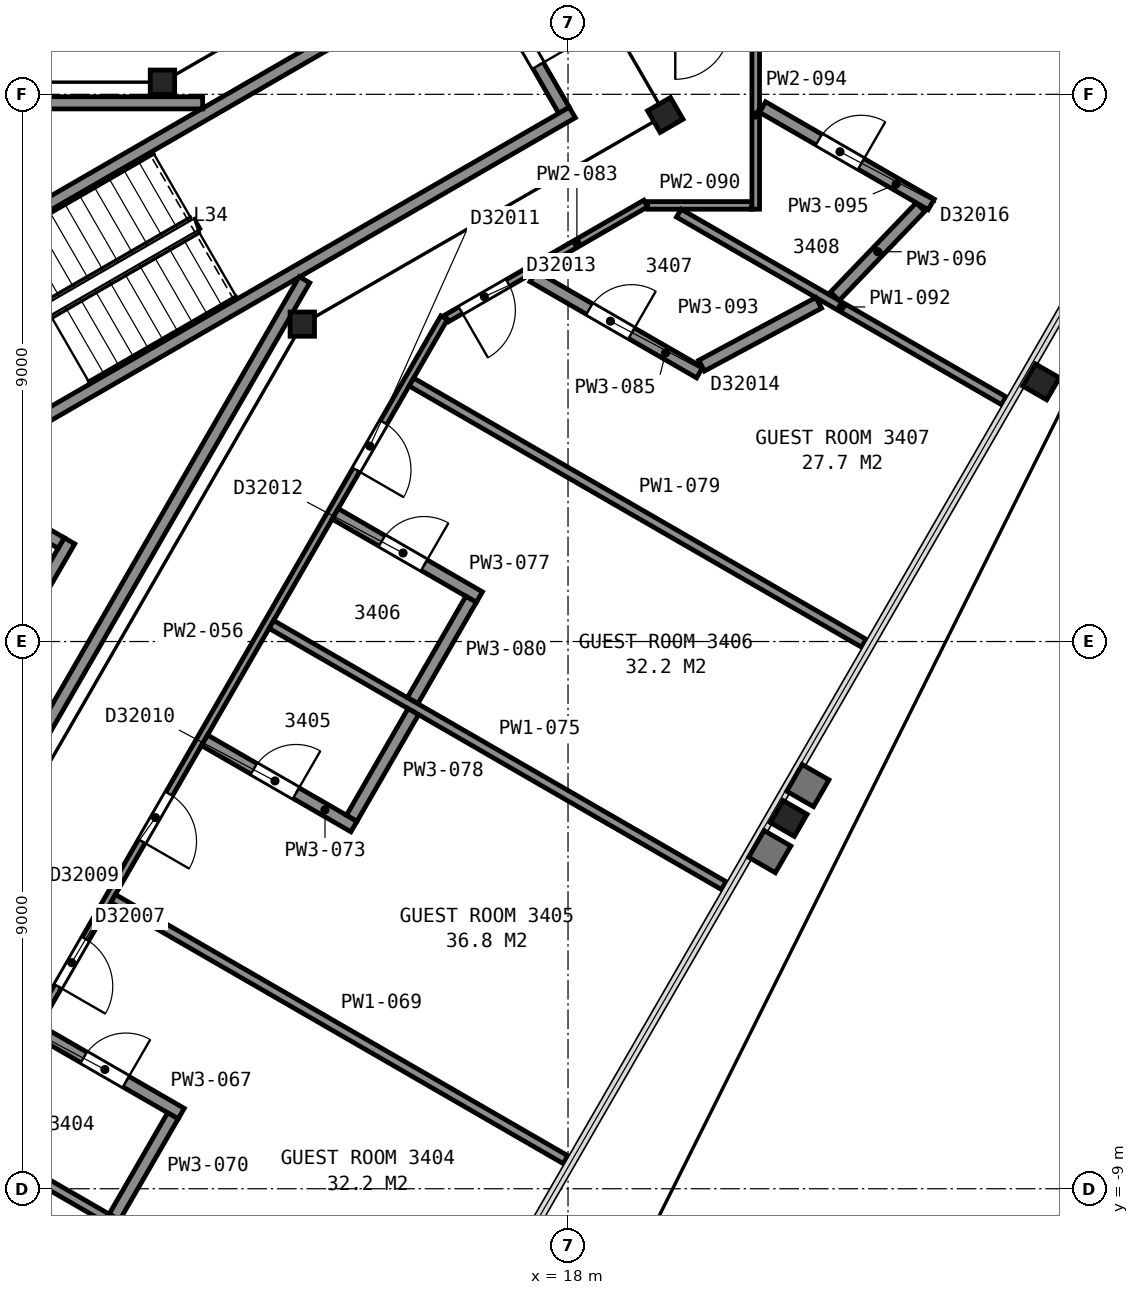
"""IFC4 building model, lengths in metres.
Left out: names, types, materials, properties, quantities, classifications, styles, units other than length and angle.
Written with IfcOpenShell. Run it as: python <this file> out.ifc"""

import sys

from ifc_helpers import new_model, si_unit, direction, frame, frame_2d, origin, origin_2d, place, context, subcontext, project, spatial, rectangle, i_section, extrude, element, fill, save


model = new_model("IFC4")
c1 = context("Model", 3, precision=1e-05, world=origin(), true_north=direction((0.0, 1.0)))
c2 = subcontext(c1, "Body", "Model", "MODEL_VIEW")
j1 = project(units=[si_unit("LENGTHUNIT", "METRE"), si_unit("PLANEANGLEUNIT", "RADIAN")], contexts=[c1])
p1 = place(None, origin())
s1 = spatial("IfcSite", under=j1, at=p1, CompositionType="ELEMENT")
p2 = place(p1, origin())
s2 = spatial("IfcBuilding", under=s1, at=p2, CompositionType="ELEMENT")
p3 = place(p2, frame((0.0, 0.0, 139.6)))
s3 = spatial("IfcBuildingStorey", under=s2, at=p3, CompositionType="ELEMENT", Elevation=139.6)
for number, where, z_axis, x_axis in (
    (1, (21.63, -2.91, 0.0), (0.0, 0.0, 1.0), (-0.5, -0.866, 0.0)),
    (2, (25.78, 4.27, 0.0), (0.0, 0.0, 1.0), (-0.5, -0.866, 0.0)),
):
    element("IfcColumn", number, at=place(p3, frame(where, z_axis=z_axis, x_axis=x_axis)), inside=s3, PredefinedType="COLUMN", context=c2, shape_type="SweptSolid", body=[
        extrude(i_section(OverallWidth=0.419, OverallDepth=0.455, WebThickness=0.042, FlangeThickness=0.068, FilletRadius=0.015, at=origin_2d()), origin(), (0.0, 0.0, 1.0), 2.87),
    ])
p4 = place(p3, frame((13.63, 5.22, 0.0), z_axis=(0.0, 0.0, 1.0), x_axis=(1.0, 0.0, 0.0)))
e3 = element("IfcColumn", 3, at=p4, inside=s3, PredefinedType="COLUMN", context=c2, shape_type="SweptSolid", body=[
    extrude(i_section(OverallWidth=0.401, OverallDepth=0.399, WebThickness=0.025, FlangeThickness=0.04, FilletRadius=0.015, at=origin_2d()), origin(), (0.0, 0.0, 1.0), 3.535),
])
p5 = place(p3, frame((19.6, 8.66, 0.0), z_axis=(0.0, 0.0, 1.0), x_axis=(0.5, -0.866025403784, 0.0)))
e4 = element("IfcColumn", 4, at=p5, inside=s3, PredefinedType="COLUMN", context=c2, shape_type="SweptSolid", body=[
    extrude(i_section(OverallWidth=0.411, OverallDepth=0.434, WebThickness=0.036, FlangeThickness=0.057, FilletRadius=0.015, at=origin_2d()), origin(), (0.0, 0.0, 1.0), 3.545),
])
p6 = place(p3, frame((11.33, 9.2, 0.0), z_axis=(0.0, 0.0, 1.0), x_axis=(1.0, 0.0, 0.0)))
e5 = element("IfcColumn", 5, at=p6, inside=s3, PredefinedType="COLUMN", context=c2, shape_type="SweptSolid", body=[
    extrude(i_section(OverallWidth=0.401, OverallDepth=0.399, WebThickness=0.025, FlangeThickness=0.04, FilletRadius=0.015, at=origin_2d()), origin(), (0.0, 0.0, 1.0), 3.535),
])
p7 = place(p3, frame((17.934, 8.738, 0.0), z_axis=(0.0, 0.0, 1.0), x_axis=(-0.49998411664, 0.866034573852, 0.0)))
e6 = element("IfcWall", 6, at=p7, inside=s3, PredefinedType="PARTITIONING", context=c2, shape_type="SweptSolid", body=[
    extrude(rectangle(XDim=2.8, YDim=0.2, at=frame_2d((1.4, 0.0))), origin(), (0.0, 0.0, 1.0), 3.35),
])
p8 = place(p7, frame((0.85, 0.0, 0.0)))
e7 = element("IfcOpeningElement", 7, at=p8, cuts=e6, PredefinedType="OPENING", context=c2, shape_type="SweptSolid", body=[
    extrude(rectangle(XDim=1.1, YDim=2.1, at=frame_2d((0.55, 1.05))), frame((0.0, 0.11, 0.0), z_axis=(0.0, -1.0, 0.0), x_axis=(1.0, 0.0, 0.0)), (0.0, 0.0, 1.0), 0.22),
])
for number, where, z_axis, x_axis in (
    (8, (6.178, 5.299, 0.0), (0.0, 0.0, 1.0), (0.866, 0.5, 0.0)),
    (9, (7.678, 2.701, 0.0), (0.0, 0.0, 1.0), (0.866, 0.5, 0.0)),
):
    element("IfcWall", number, at=place(p3, frame(where, z_axis=z_axis, x_axis=x_axis)), inside=s3, PredefinedType="PARTITIONING", context=c2, shape_type="SweptSolid", body=[
        extrude(rectangle(XDim=12.0, YDim=0.2, at=frame_2d((6.0, 0.0))), origin(), (0.0, 0.0, 1.0), 3.35),
    ])
p9 = place(p3, frame((7.451, -2.414, 0.0), z_axis=(0.0, 0.0, 1.0), x_axis=(0.500016218704, 0.866016039709, 0.0)))
e10 = element("IfcWall", 10, at=p9, inside=s3, PredefinedType="PARTITIONING", context=c2, shape_type="SweptSolid", body=[
    extrude(rectangle(XDim=4.7, YDim=0.2, at=frame_2d((2.35, 0.0))), origin(), (0.0, 0.0, 1.0), 3.6),
])
p10 = place(p3, frame((9.665, 1.62, 0.0), z_axis=(0.0, 0.0, 1.0), x_axis=(-0.866002029911, 0.500040482552, 0.0)))
e11 = element("IfcWall", 11, at=p10, inside=s3, PredefinedType="PARTITIONING", context=c2, shape_type="SweptSolid", body=[
    extrude(rectangle(XDim=1.75, YDim=0.2, at=frame_2d((0.875, 0.0))), origin(), (0.0, 0.0, 1.0), 3.6),
])
p11 = place(p3, frame((6.177, 8.86, 0.0), z_axis=(0.0, 0.0, 1.0), x_axis=(1.0, 0.0, 0.0)))
e12 = element("IfcWall", 12, at=p11, inside=s3, PredefinedType="PARTITIONING", context=c2, shape_type="SweptSolid", body=[
    extrude(rectangle(XDim=5.814, YDim=0.2, at=frame_2d((2.907, 0.0))), origin(), (0.0, 0.0, 1.0), 3.35),
])
p12 = place(p3, frame((8.492, -3.012, 0.0), z_axis=(0.0, 0.0, 1.0), x_axis=(0.499972957231, 0.866041016371, 0.0)))
e13 = element("IfcWall", 13, at=p12, inside=s3, PredefinedType="PARTITIONING", context=c2, shape_type="SweptSolid", body=[
    extrude(rectangle(XDim=10.349, YDim=0.2, at=frame_2d((5.174, 0.0))), origin(), (0.0, 0.0, 1.0), 3.35),
])
p13 = place(p3, frame((15.962, 5.326, 0.0), z_axis=(0.0, 0.0, 1.0), x_axis=(-0.499992829944, -0.866029543379, 0.0)))
e14 = element("IfcWall", 14, at=p13, inside=s3, PredefinedType="PARTITIONING", context=c2, shape_type="SweptSolid", body=[
    extrude(rectangle(XDim=24.413, YDim=0.125, at=frame_2d((12.207, 0.0))), origin(), (0.0, 0.0, 1.0), 2.262),
])
p14 = place(p13, frame((21.258, 0.0, 0.0)))
e15 = element("IfcOpeningElement", 15, at=p14, cuts=e14, PredefinedType="OPENING", context=c2, shape_type="SweptSolid", body=[
    extrude(rectangle(XDim=0.9, YDim=2.1, at=frame_2d((0.45, 1.05))), frame((0.0, 0.073, 0.0), z_axis=(0.0, -1.0, 0.0), x_axis=(1.0, 0.0, 0.0)), (0.0, 0.0, 1.0), 0.145),
])
p15 = place(p13, frame((18.502, 0.0, 0.0)))
e16 = element("IfcOpeningElement", 16, at=p15, cuts=e14, PredefinedType="OPENING", context=c2, shape_type="SweptSolid", body=[
    extrude(rectangle(XDim=0.9, YDim=2.1, at=frame_2d((0.45, 1.05))), frame((0.0, 0.073, 0.0), z_axis=(0.0, -1.0, 0.0), x_axis=(1.0, 0.0, 0.0)), (0.0, 0.0, 1.0), 0.145),
])
p16 = place(p13, frame((11.799, 0.0, 0.0)))
e17 = element("IfcOpeningElement", 17, at=p16, cuts=e14, PredefinedType="OPENING", context=c2, shape_type="SweptSolid", body=[
    extrude(rectangle(XDim=0.9, YDim=2.1, at=frame_2d((0.45, 1.05))), frame((0.0, 0.073, 0.0), z_axis=(0.0, -1.0, 0.0), x_axis=(1.0, 0.0, 0.0)), (0.0, 0.0, 1.0), 0.145),
])
p17 = place(p13, frame((9.043, 0.0, 0.0)))
e18 = element("IfcOpeningElement", 18, at=p17, cuts=e14, PredefinedType="OPENING", context=c2, shape_type="SweptSolid", body=[
    extrude(rectangle(XDim=0.9, YDim=2.1, at=frame_2d((0.45, 1.05))), frame((0.0, 0.073, 0.0), z_axis=(0.0, -1.0, 0.0), x_axis=(1.0, 0.0, 0.0)), (0.0, 0.0, 1.0), 0.145),
])
p18 = place(p13, frame((1.99, 0.0, 0.0)))
e19 = element("IfcOpeningElement", 19, at=p18, cuts=e14, PredefinedType="OPENING", context=c2, shape_type="SweptSolid", body=[
    extrude(rectangle(XDim=0.9, YDim=2.1, at=frame_2d((0.45, 1.05))), frame((0.0, 0.073, 0.0), z_axis=(0.0, -1.0, 0.0), x_axis=(1.0, 0.0, 0.0)), (0.0, 0.0, 1.0), 0.145),
])
p19 = place(p3, frame((8.218, -8.213, 0.0), z_axis=(0.0, 0.0, 1.0), x_axis=(0.865997709989, -0.500047963993, 0.0)))
e20 = element("IfcWall", 20, at=p19, inside=s3, PredefinedType="PARTITIONING", context=c2, shape_type="SweptSolid", body=[
    extrude(rectangle(XDim=8.592, YDim=0.15, at=frame_2d((4.296, 0.0))), origin(), (0.0, 0.0, 1.0), 2.262),
])
p20 = place(p3, frame((11.639, -7.764, 0.0), z_axis=(0.0, 0.0, 1.0), x_axis=(-0.866028150195, 0.499995243048, 0.0)))
e21 = element("IfcWall", 21, at=p20, inside=s3, PredefinedType="PARTITIONING", context=c2, shape_type="SweptSolid", body=[
    extrude(rectangle(XDim=2.737, YDim=0.2, at=frame_2d((1.369, 0.0))), origin(), (0.0, 0.0, 1.0), 2.262),
])
p21 = place(p20, frame((1.05, 0.0, 0.0)))
e22 = element("IfcOpeningElement", 22, at=p21, cuts=e21, PredefinedType="OPENING", context=c2, shape_type="SweptSolid", body=[
    extrude(rectangle(XDim=0.8, YDim=2.1, at=frame_2d((0.4, 1.05))), frame((0.0, 0.11, 0.0), z_axis=(0.0, -1.0, 0.0), x_axis=(1.0, 0.0, 0.0)), (0.0, 0.0, 1.0), 0.22),
])
p22 = place(p3, frame((10.52, -4.226, 0.0), z_axis=(0.0, 0.0, 1.0), x_axis=(0.866002910178, -0.500038958046, 0.0)))
e23 = element("IfcWall", 23, at=p22, inside=s3, PredefinedType="PARTITIONING", context=c2, shape_type="SweptSolid", body=[
    extrude(rectangle(XDim=8.591, YDim=0.15, at=frame_2d((4.295, 0.0))), origin(), (0.0, 0.0, 1.0), 2.262),
])
p23 = place(p3, frame((10.542, -9.463, 0.0), z_axis=(0.0, 0.0, 1.0), x_axis=(0.500214044309, 0.865901789971, 0.0)))
e24 = element("IfcWall", 24, at=p23, inside=s3, PredefinedType="PARTITIONING", context=c2, shape_type="SweptSolid", body=[
    extrude(rectangle(XDim=1.92, YDim=0.2, at=frame_2d((0.96, 0.0))), origin(), (0.0, 0.0, 1.0), 2.262),
])
p24 = place(p3, frame((12.022, -1.624, 0.0), z_axis=(0.0, 0.0, 1.0), x_axis=(0.866026538634, -0.499998034377, 0.0)))
e25 = element("IfcWall", 25, at=p24, inside=s3, PredefinedType="PARTITIONING", context=c2, shape_type="SweptSolid", body=[
    extrude(rectangle(XDim=2.837, YDim=0.2, at=frame_2d((1.419, 0.0))), origin(), (0.0, 0.0, 1.0), 2.262),
])
p25 = place(p24, frame((0.938, 0.0, 0.0)))
e26 = element("IfcOpeningElement", 26, at=p25, cuts=e25, PredefinedType="OPENING", context=c2, shape_type="SweptSolid", body=[
    extrude(rectangle(XDim=0.8, YDim=2.1, at=frame_2d((0.4, 1.05))), frame((0.0, 0.11, 0.0), z_axis=(0.0, -1.0, 0.0), x_axis=(1.0, 0.0, 0.0)), (0.0, 0.0, 1.0), 0.22),
])
p26 = place(p3, frame((13.122, 0.281, 0.0), z_axis=(0.0, 0.0, 1.0), x_axis=(0.866029425019, -0.499993034952, 0.0)))
e27 = element("IfcWall", 27, at=p26, inside=s3, PredefinedType="PARTITIONING", context=c2, shape_type="SweptSolid", body=[
    extrude(rectangle(XDim=8.591, YDim=0.15, at=frame_2d((4.296, 0.0))), origin(), (0.0, 0.0, 1.0), 2.262),
])
p27 = place(p3, frame((16.542, 0.731, 0.0), z_axis=(0.0, 0.0, 1.0), x_axis=(-0.86596722502, 0.50010075504, 0.0)))
e28 = element("IfcWall", 28, at=p27, inside=s3, PredefinedType="PARTITIONING", context=c2, shape_type="SweptSolid", body=[
    extrude(rectangle(XDim=2.737, YDim=0.2, at=frame_2d((1.369, 0.0))), origin(), (0.0, 0.0, 1.0), 2.262),
])
p28 = place(p27, frame((1.05, 0.0, 0.0)))
e29 = element("IfcOpeningElement", 29, at=p28, cuts=e28, PredefinedType="OPENING", context=c2, shape_type="SweptSolid", body=[
    extrude(rectangle(XDim=0.8, YDim=2.1, at=frame_2d((0.4, 1.05))), frame((0.0, 0.11, 0.0), z_axis=(0.0, -1.0, 0.0), x_axis=(1.0, 0.0, 0.0)), (0.0, 0.0, 1.0), 0.22),
])
p29 = place(p3, frame((14.443, -2.906, 0.0), z_axis=(0.0, 0.0, 1.0), x_axis=(0.500042536776, 0.866000843773, 0.0)))
e30 = element("IfcWall", 30, at=p29, inside=s3, PredefinedType="PARTITIONING", context=c2, shape_type="SweptSolid", body=[
    extrude(rectangle(XDim=2.025, YDim=0.2, at=frame_2d((1.012, 0.0))), origin(), (0.0, 0.0, 1.0), 2.262),
])
p30 = place(p3, frame((15.424, 4.268, 0.0), z_axis=(0.0, 0.0, 1.0), x_axis=(0.866022320763, -0.500005339912, 0.0)))
e31 = element("IfcWall", 31, at=p30, inside=s3, PredefinedType="PARTITIONING", context=c2, shape_type="SweptSolid", body=[
    extrude(rectangle(XDim=8.591, YDim=0.15, at=frame_2d((4.296, 0.0))), origin(), (0.0, 0.0, 1.0), 2.262),
])
p31 = place(p3, frame((15.446, -0.969, 0.0), z_axis=(0.0, 0.0, 1.0), x_axis=(0.499913221443, 0.866075499611, 0.0)))
e32 = element("IfcWall", 32, at=p31, inside=s3, PredefinedType="PARTITIONING", context=c2, shape_type="SweptSolid", body=[
    extrude(rectangle(XDim=1.92, YDim=0.2, at=frame_2d((0.96, 0.0))), origin(), (0.0, 0.0, 1.0), 2.262),
])
p32 = place(p3, frame((19.278, 7.204, 0.0), z_axis=(0.0, 0.0, 1.0), x_axis=(-0.866028547684, -0.499994554566, 0.0)))
e33 = element("IfcWall", 33, at=p32, inside=s3, PredefinedType="PARTITIONING", context=c2, shape_type="SweptSolid", body=[
    extrude(rectangle(XDim=3.78, YDim=0.125, at=frame_2d((1.89, 0.0))), origin(), (0.0, 0.0, 1.0), 2.262),
])
p33 = place(p32, frame((2.615, 0.0, 0.0)))
e34 = element("IfcOpeningElement", 34, at=p33, cuts=e33, PredefinedType="OPENING", context=c2, shape_type="SweptSolid", body=[
    extrude(rectangle(XDim=0.9, YDim=2.1, at=frame_2d((0.45, 1.05))), frame((0.0, 0.073, 0.0), z_axis=(0.0, -1.0, 0.0), x_axis=(1.0, 0.0, 0.0)), (0.0, 0.0, 1.0), 0.145),
])
p34 = place(p3, frame((17.425, 6.004, 0.0), z_axis=(0.0, 0.0, 1.0), x_axis=(0.866145753309, -0.499791490549, 0.0)))
e35 = element("IfcWall", 35, at=p34, inside=s3, PredefinedType="PARTITIONING", context=c2, shape_type="SweptSolid", body=[
    extrude(rectangle(XDim=3.163, YDim=0.2, at=frame_2d((1.582, 0.0))), origin(), (0.0, 0.0, 1.0), 2.262),
])
p35 = place(p34, frame((1.07, 0.0, 0.0)))
e36 = element("IfcOpeningElement", 36, at=p35, cuts=e35, PredefinedType="OPENING", context=c2, shape_type="SweptSolid", body=[
    extrude(rectangle(XDim=0.8, YDim=2.1, at=frame_2d((0.4, 1.05))), frame((0.0, 0.11, 0.0), z_axis=(0.0, -1.0, 0.0), x_axis=(1.0, 0.0, 0.0)), (0.0, 0.0, 1.0), 0.22),
])
p36 = place(p3, frame((19.309, 7.173, 0.0), z_axis=(0.0, 0.0, 1.0), x_axis=(1.0, 0.0, 0.0)))
e37 = element("IfcWall", 37, at=p36, inside=s3, PredefinedType="PARTITIONING", context=c2, shape_type="SweptSolid", body=[
    extrude(rectangle(XDim=1.713, YDim=0.125, at=frame_2d((0.856, 0.0))), origin(), (0.0, 0.0, 1.0), 2.262),
])
p37 = place(p3, frame((19.822, 7.046, 0.0), z_axis=(0.0, 0.0, 1.0), x_axis=(0.866041323853, -0.499972424619, 0.0)))
e38 = element("IfcWall", 38, at=p37, inside=s3, PredefinedType="PARTITIONING", context=c2, shape_type="SweptSolid", body=[
    extrude(rectangle(XDim=6.172, YDim=0.15, at=frame_2d((3.086, 0.0))), origin(), (0.0, 0.0, 1.0), 2.262),
])
p38 = place(p3, frame((20.197, 4.537, 0.0), z_axis=(0.0, 0.0, 1.0), x_axis=(0.881162538645, 0.472813473253, 0.0)))
e39 = element("IfcWall", 39, at=p38, inside=s3, PredefinedType="PARTITIONING", context=c2, shape_type="SweptSolid", body=[
    extrude(rectangle(XDim=2.185, YDim=0.2, at=frame_2d((1.093, 0.0))), origin(), (0.0, 0.0, 1.0), 2.262),
])
p39 = place(p3, frame((21.087, 7.111, 0.0), z_axis=(0.0, 0.0, 1.0), x_axis=(0.0, 1.0, 0.0)))
e40 = element("IfcWall", 40, at=p39, inside=s3, PredefinedType="PARTITIONING", context=c2, shape_type="SweptSolid", body=[
    extrude(rectangle(XDim=3.099, YDim=0.125, at=frame_2d((1.549, 0.0))), origin(), (0.0, 0.0, 1.0), 2.262),
])
p40 = place(p3, frame((23.974, 7.189, 0.0), z_axis=(0.0, 0.0, 1.0), x_axis=(-0.866105631149, 0.499861016376, 0.0)))
e41 = element("IfcWall", 41, at=p40, inside=s3, PredefinedType="PARTITIONING", context=c2, shape_type="SweptSolid", body=[
    extrude(rectangle(XDim=3.203, YDim=0.2, at=frame_2d((1.602, 0.0))), origin(), (0.0, 0.0, 1.0), 2.262),
])
p41 = place(p40, frame((1.333, 0.0, 0.0)))
e42 = element("IfcOpeningElement", 42, at=p41, cuts=e41, PredefinedType="OPENING", context=c2, shape_type="SweptSolid", body=[
    extrude(rectangle(XDim=0.8, YDim=2.1, at=frame_2d((0.4, 1.05))), frame((0.0, 0.11, 0.0), z_axis=(0.0, -1.0, 0.0), x_axis=(1.0, 0.0, 0.0)), (0.0, 0.0, 1.0), 0.22),
])
p42 = place(p3, frame((22.388, 5.677, 0.0), z_axis=(0.0, 0.0, 1.0), x_axis=(0.692374421384, 0.721538398572, 0.0)))
e43 = element("IfcWall", 43, at=p42, inside=s3, PredefinedType="PARTITIONING", context=c2, shape_type="SweptSolid", body=[
    extrude(rectangle(XDim=2.034, YDim=0.2, at=frame_2d((1.017, 0.0))), origin(), (0.0, 0.0, 1.0), 2.262),
])
p43 = place(p8, origin())
e44 = element("IfcDoor", 44, at=p43, inside=s3, OperationType="SINGLE_SWING_LEFT", PredefinedType="DOOR", context=c2, shape_type="SweptSolid", body=[
    extrude(rectangle(XDim=1.1, YDim=2.1, at=frame_2d((0.55, 1.05))), frame((0.0, 0.025, 0.0), z_axis=(0.0, -1.0, 0.0), x_axis=(1.0, 0.0, 0.0)), (0.0, 0.0, 1.0), 0.05),
])
fill(e7, e44)
p44 = place(p16, origin())
e45 = element("IfcDoor", 45, at=p44, inside=s3, OperationType="SINGLE_SWING_RIGHT", PredefinedType="DOOR", context=c2, shape_type="SweptSolid", body=[
    extrude(rectangle(XDim=0.9, YDim=2.1, at=frame_2d((0.45, 1.05))), frame((0.0, 0.025, 0.0), z_axis=(0.0, -1.0, 0.0), x_axis=(1.0, 0.0, 0.0)), (0.0, 0.0, 1.0), 0.05),
])
fill(e17, e45)
p45 = place(p17, origin())
e46 = element("IfcDoor", 46, at=p45, inside=s3, OperationType="SINGLE_SWING_RIGHT", PredefinedType="DOOR", context=c2, shape_type="SweptSolid", body=[
    extrude(rectangle(XDim=0.9, YDim=2.1, at=frame_2d((0.45, 1.05))), frame((0.0, 0.025, 0.0), z_axis=(0.0, -1.0, 0.0), x_axis=(1.0, 0.0, 0.0)), (0.0, 0.0, 1.0), 0.05),
])
fill(e18, e46)
p46 = place(p18, origin())
e47 = element("IfcDoor", 47, at=p46, inside=s3, OperationType="SINGLE_SWING_RIGHT", PredefinedType="DOOR", context=c2, shape_type="SweptSolid", body=[
    extrude(rectangle(XDim=0.9, YDim=2.1, at=frame_2d((0.45, 1.05))), frame((0.0, 0.025, 0.0), z_axis=(0.0, -1.0, 0.0), x_axis=(1.0, 0.0, 0.0)), (0.0, 0.0, 1.0), 0.05),
])
fill(e19, e47)
p47 = place(p21, origin())
e48 = element("IfcDoor", 48, at=p47, inside=s3, OperationType="SINGLE_SWING_LEFT", PredefinedType="DOOR", context=c2, shape_type="SweptSolid", body=[
    extrude(rectangle(XDim=0.8, YDim=2.1, at=frame_2d((0.4, 1.05))), frame((0.0, 0.025, 0.0), z_axis=(0.0, -1.0, 0.0), x_axis=(1.0, 0.0, 0.0)), (0.0, 0.0, 1.0), 0.05),
])
fill(e22, e48)
p48 = place(p25, origin())
e49 = element("IfcDoor", 49, at=p48, inside=s3, OperationType="SINGLE_SWING_RIGHT", PredefinedType="DOOR", context=c2, shape_type="SweptSolid", body=[
    extrude(rectangle(XDim=0.8, YDim=2.1, at=frame_2d((0.4, 1.05))), frame((0.0, 0.025, 0.0), z_axis=(0.0, -1.0, 0.0), x_axis=(1.0, 0.0, 0.0)), (0.0, 0.0, 1.0), 0.05),
])
fill(e26, e49)
p49 = place(p28, origin())
e50 = element("IfcDoor", 50, at=p49, inside=s3, OperationType="SINGLE_SWING_LEFT", PredefinedType="DOOR", context=c2, shape_type="SweptSolid", body=[
    extrude(rectangle(XDim=0.8, YDim=2.1, at=frame_2d((0.4, 1.05))), frame((0.0, 0.025, 0.0), z_axis=(0.0, -1.0, 0.0), x_axis=(1.0, 0.0, 0.0)), (0.0, 0.0, 1.0), 0.05),
])
fill(e29, e50)
p50 = place(p33, origin())
e51 = element("IfcDoor", 51, at=p50, inside=s3, OperationType="SINGLE_SWING_RIGHT", PredefinedType="DOOR", context=c2, shape_type="SweptSolid", body=[
    extrude(rectangle(XDim=0.9, YDim=2.1, at=frame_2d((0.45, 1.05))), frame((0.0, 0.025, 0.0), z_axis=(0.0, -1.0, 0.0), x_axis=(1.0, 0.0, 0.0)), (0.0, 0.0, 1.0), 0.05),
])
fill(e34, e51)
p51 = place(p35, origin())
e52 = element("IfcDoor", 52, at=p51, inside=s3, OperationType="SINGLE_SWING_RIGHT", PredefinedType="DOOR", context=c2, shape_type="SweptSolid", body=[
    extrude(rectangle(XDim=0.8, YDim=2.1, at=frame_2d((0.4, 1.05))), frame((0.0, 0.025, 0.0), z_axis=(0.0, -1.0, 0.0), x_axis=(1.0, 0.0, 0.0)), (0.0, 0.0, 1.0), 0.05),
])
fill(e36, e52)
p52 = place(p41, origin())
e53 = element("IfcDoor", 53, at=p52, inside=s3, OperationType="SINGLE_SWING_LEFT", PredefinedType="DOOR", context=c2, shape_type="SweptSolid", body=[
    extrude(rectangle(XDim=0.8, YDim=2.1, at=frame_2d((0.4, 1.05))), frame((0.0, 0.025, 0.0), z_axis=(0.0, -1.0, 0.0), x_axis=(1.0, 0.0, 0.0)), (0.0, 0.0, 1.0), 0.05),
])
fill(e42, e53)
save(model, sys.argv[1])
